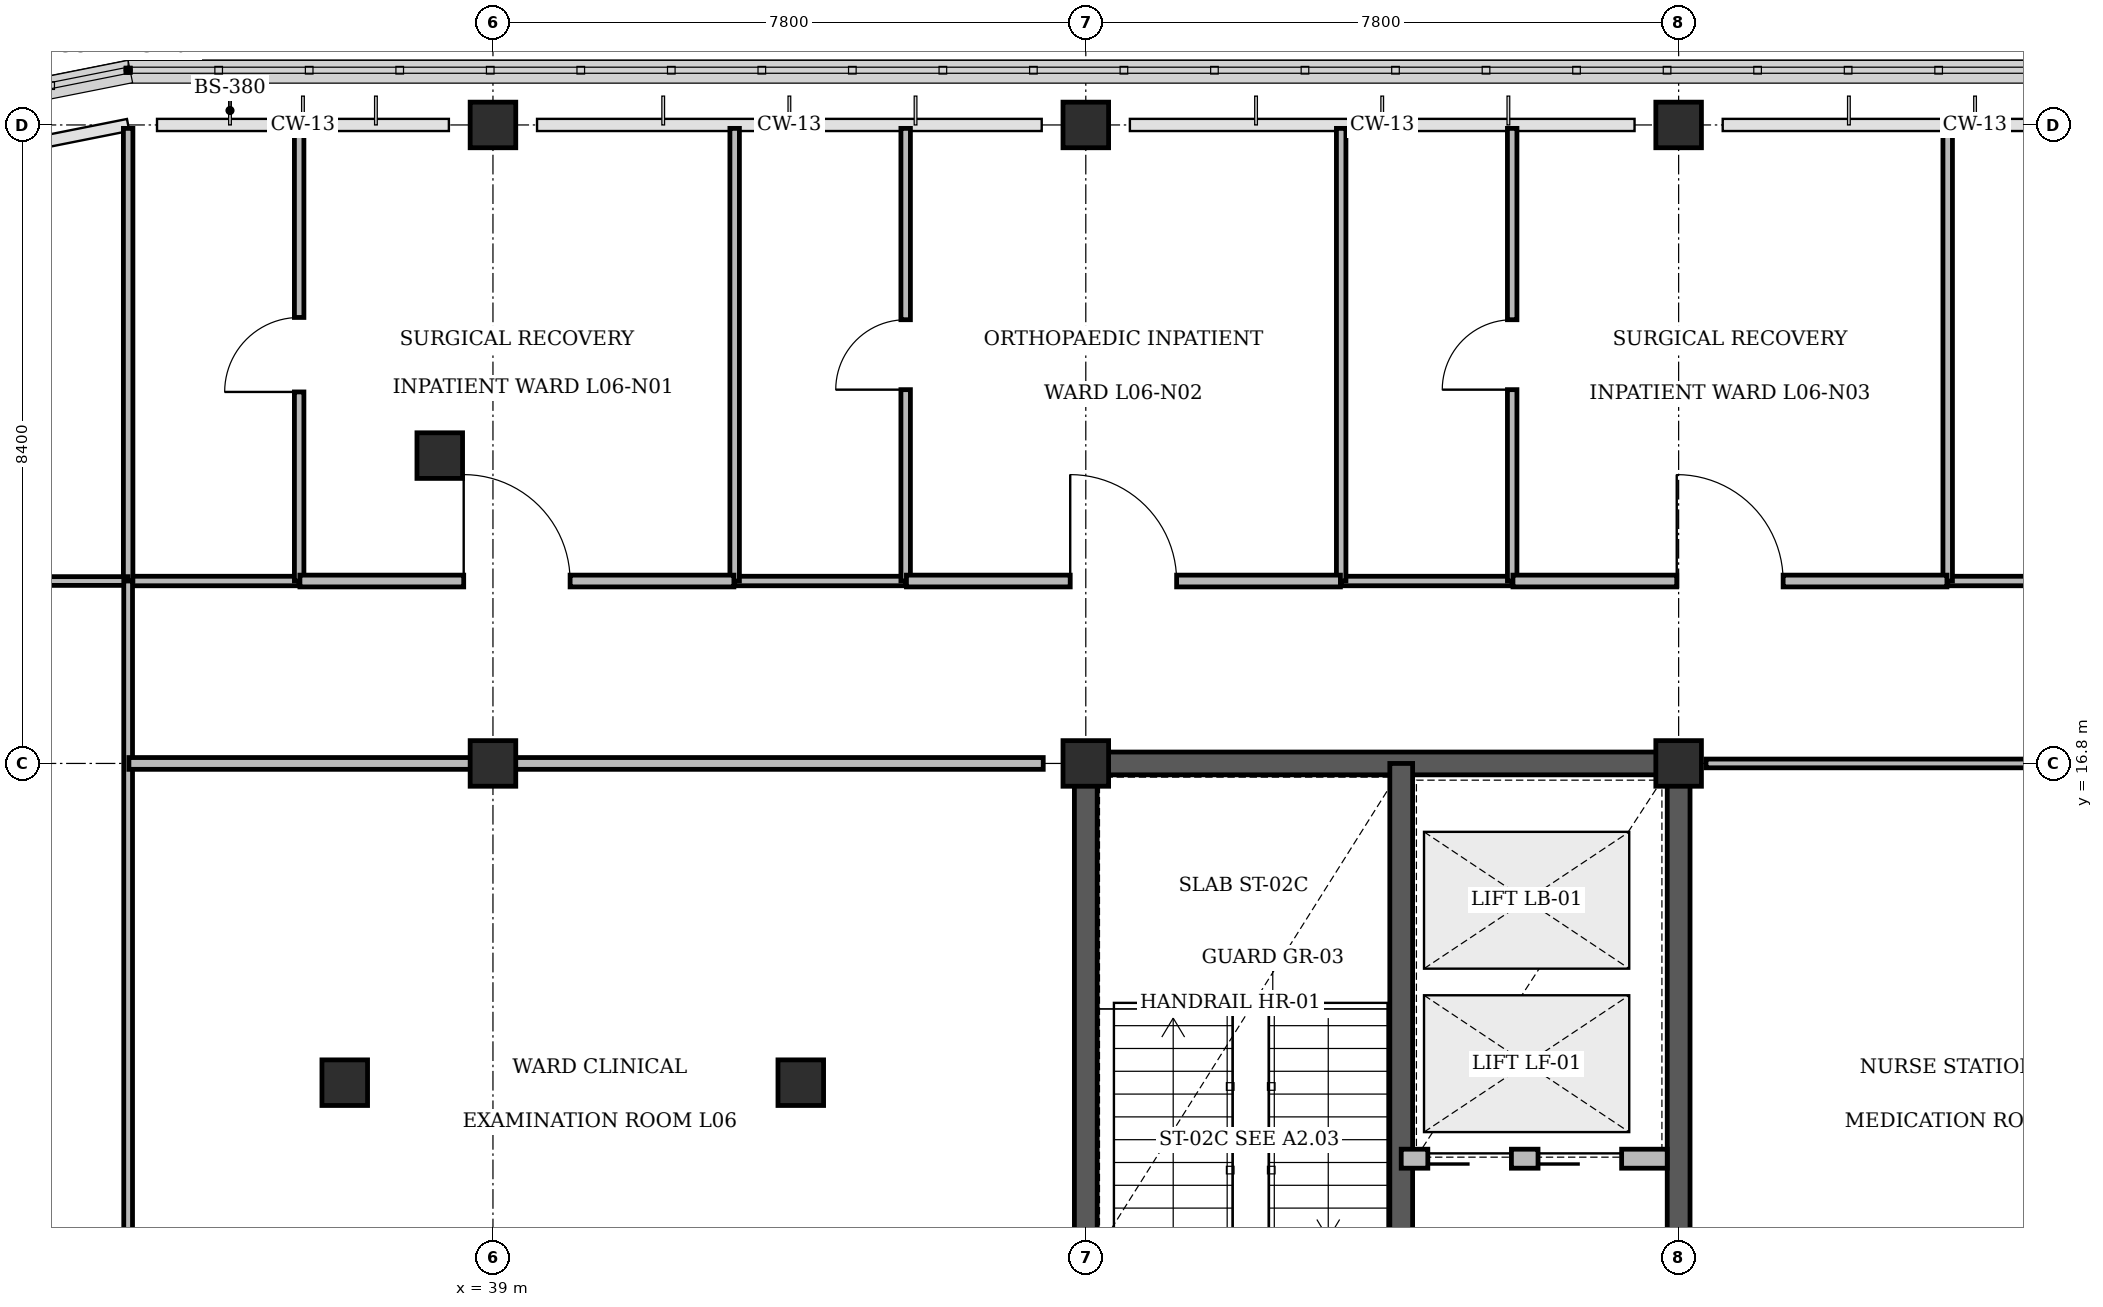
"""IFC4 building model, lengths in metres.
Left out: names, types, materials, properties, quantities, classifications, styles, units other than length and angle.
Written with IfcOpenShell. Run it as: python <this file> out.ifc"""

import sys

from ifc_helpers import new_model, si_unit, direction, frame, frame_2d, origin, origin_2d, place, context, subcontext, project, spatial, rectangle, circle, extrude, element, fill, save


model = new_model("IFC4")
c1 = context("Model", 3, precision=1e-05, world=origin(), true_north=direction((0.0, 1.0)))
c2 = subcontext(c1, "Body", "Model", "MODEL_VIEW")
j1 = project(units=[si_unit("LENGTHUNIT", "METRE"), si_unit("PLANEANGLEUNIT", "RADIAN")], contexts=[c1])
p1 = place(None, origin())
s1 = spatial("IfcSite", under=j1, at=p1, CompositionType="ELEMENT")
p2 = place(p1, origin())
s2 = spatial("IfcBuilding", under=s1, at=p2, CompositionType="ELEMENT")
p3 = place(p2, frame((0.0, 0.0, 26.4)))
s3 = spatial("IfcBuildingStorey", under=s2, at=p3, CompositionType="ELEMENT", Elevation=26.4)
p4 = place(p3, frame((46.65, 16.8, 0.0), z_axis=(0.0, 0.0, 1.0), x_axis=(1.0, 0.0, 0.0)))
e1 = element("IfcWall", 1, at=p4, inside=s3, PredefinedType="SHEAR", context=c2, shape_type="SweptSolid", body=[
    extrude(rectangle(XDim=8.1, YDim=0.3, at=frame_2d((4.05, 0.0))), origin(), (0.0, 0.0, 1.0), 3.92),
])
for number, where, z_axis, x_axis in (
    (2, (46.8, 8.4, 0.0), (0.0, 0.0, 1.0), (0.0, 1.0, 0.0)),
    (3, (54.6, 8.4, 0.0), (0.0, 0.0, 1.0), (0.0, 1.0, 0.0)),
):
    element("IfcWall", number, at=place(p3, frame(where, z_axis=z_axis, x_axis=x_axis)), inside=s3, PredefinedType="SHEAR", context=c2, shape_type="SweptSolid", body=[
        extrude(rectangle(XDim=8.4, YDim=0.3, at=frame_2d((4.2, 0.0))), origin(), (0.0, 0.0, 1.0), 3.92),
    ])
for number, where, z_axis, x_axis in (
    (4, (39.0, 16.8, 0.0), (0.0, 0.0, 1.0), (1.0, 0.0, 0.0)),
    (5, (39.0, 25.2, 0.0), (0.0, 0.0, 1.0), (1.0, 0.0, 0.0)),
    (6, (46.8, 16.8, 0.0), (0.0, 0.0, 1.0), (1.0, 0.0, 0.0)),
    (7, (46.8, 25.2, 0.0), (0.0, 0.0, 1.0), (1.0, 0.0, 0.0)),
    (8, (54.6, 16.8, 0.0), (0.0, 0.0, 1.0), (1.0, 0.0, 0.0)),
    (9, (54.6, 25.2, 0.0), (0.0, 0.0, 1.0), (1.0, 0.0, 0.0)),
):
    element("IfcColumn", number, at=place(p3, frame(where, z_axis=z_axis, x_axis=x_axis)), inside=s3, PredefinedType="COLUMN", context=c2, shape_type="SweptSolid", body=[
        extrude(rectangle(XDim=0.6, YDim=0.6, at=origin_2d()), origin(), (0.0, 0.0, 1.0), 4.2),
    ])
for number, where, z_axis, x_axis in (
    (10, (37.05, 12.6, 0.0), (0.0, 0.0, 1.0), (1.0, 0.0, 0.0)),
    (11, (38.3, 20.85, 0.0), (0.0, 0.0, 1.0), (1.0, 0.0, 0.0)),
    (12, (43.05, 12.6, 0.0), (0.0, 0.0, 1.0), (1.0, 0.0, 0.0)),
):
    element("IfcColumn", number, at=place(p3, frame(where, z_axis=z_axis, x_axis=x_axis)), inside=s3, PredefinedType="PILASTER", context=c2, shape_type="SweptSolid", body=[
        extrude(circle(Radius=0.3, at=origin_2d()), origin(), (0.0, 0.0, 1.0), 4.2),
    ])
p5 = place(p3, frame((50.95, 8.4, 0.0), z_axis=(0.0, 0.0, 1.0), x_axis=(0.0, 1.0, 0.0)))
e13 = element("IfcWall", 13, at=p5, inside=s3, PredefinedType="SHEAR", context=c2, shape_type="SweptSolid", body=[
    extrude(rectangle(XDim=8.4, YDim=0.3, at=frame_2d((4.2, 0.0))), origin(), (0.0, 0.0, 1.0), 4.2),
])
p6 = place(p5, frame((0.4, 0.0, 0.0)))
e14 = element("IfcOpeningElement", 14, at=p6, cuts=e13, PredefinedType="OPENING", context=c2, shape_type="SweptSolid", body=[
    extrude(rectangle(XDim=1.12, YDim=2.15, at=frame_2d((0.56, 1.075))), frame((0.0, 0.16, 0.0), z_axis=(0.0, -1.0, 0.0), x_axis=(1.0, 0.0, 0.0)), (0.0, 0.0, 1.0), 0.32),
])
p7 = place(p3, frame((50.95, 11.6, 0.0), z_axis=(0.0, 0.0, 1.0), x_axis=(1.0, 0.0, 0.0)))
e15 = element("IfcWall", 15, at=p7, inside=s3, PredefinedType="STANDARD", context=c2, shape_type="SweptSolid", body=[
    extrude(rectangle(XDim=3.5, YDim=0.25, at=frame_2d((1.75, 0.0))), origin(), (0.0, 0.0, 1.0), 3.9),
])
p8 = place(p7, frame((0.35, 0.0, 0.0)))
e16 = element("IfcOpeningElement", 16, at=p8, cuts=e15, PredefinedType="OPENING", context=c2, shape_type="SweptSolid", body=[
    extrude(rectangle(XDim=1.1, YDim=2.2, at=frame_2d((0.55, 1.1))), frame((0.0, 0.135, 0.0), z_axis=(0.0, -1.0, 0.0), x_axis=(1.0, 0.0, 0.0)), (0.0, 0.0, 1.0), 0.27),
])
p9 = place(p7, frame((1.8, 0.0, 0.0)))
e17 = element("IfcOpeningElement", 17, at=p9, cuts=e15, PredefinedType="OPENING", context=c2, shape_type="SweptSolid", body=[
    extrude(rectangle(XDim=1.1, YDim=2.2, at=frame_2d((0.55, 1.1))), frame((0.0, 0.135, 0.0), z_axis=(0.0, -1.0, 0.0), x_axis=(1.0, 0.0, 0.0)), (0.0, 0.0, 1.0), 0.27),
])
p10 = place(p3, frame((34.2, 19.2, 0.0), z_axis=(0.0, 0.0, 1.0), x_axis=(1.0, 0.0, 0.0)))
e18 = element("IfcWall", 18, at=p10, inside=s3, PredefinedType="PARTITIONING", context=c2, shape_type="SweptSolid", body=[
    extrude(rectangle(XDim=2.25, YDim=0.125, at=frame_2d((1.125, 0.0))), origin(), (0.0, 0.0, 1.0), 3.9),
])
p11 = place(p3, frame((34.2, 19.2, 0.0), z_axis=(0.0, 0.0, 1.0), x_axis=(0.0, 1.0, 0.0)))
e19 = element("IfcWall", 19, at=p11, inside=s3, PredefinedType="PARTITIONING", context=c2, shape_type="SweptSolid", body=[
    extrude(rectangle(XDim=5.955, YDim=0.125, at=frame_2d((2.978, 0.0))), origin(), (0.0, 0.0, 1.0), 3.9),
])
p12 = place(p3, frame((36.45, 19.2, 0.0), z_axis=(0.0, 0.0, 1.0), x_axis=(0.0, 1.0, 0.0)))
e20 = element("IfcWall", 20, at=p12, inside=s3, PredefinedType="PARTITIONING", context=c2, shape_type="SweptSolid", body=[
    extrude(rectangle(XDim=5.955, YDim=0.125, at=frame_2d((2.978, 0.0))), origin(), (0.0, 0.0, 1.0), 3.9),
])
p13 = place(p12, frame((2.488, 0.0, 0.0)))
e21 = element("IfcOpeningElement", 21, at=p13, cuts=e20, PredefinedType="OPENING", context=c2, shape_type="SweptSolid", body=[
    extrude(rectangle(XDim=0.98, YDim=2.1, at=frame_2d((0.49, 1.05))), frame((0.0, 0.073, 0.0), z_axis=(0.0, -1.0, 0.0), x_axis=(1.0, 0.0, 0.0)), (0.0, 0.0, 1.0), 0.145),
])
p14 = place(p3, frame((42.18, 19.2, 0.0), z_axis=(0.0, 0.0, 1.0), x_axis=(1.0, 0.0, 0.0)))
e22 = element("IfcWall", 22, at=p14, inside=s3, PredefinedType="PARTITIONING", context=c2, shape_type="SweptSolid", body=[
    extrude(rectangle(XDim=2.25, YDim=0.125, at=frame_2d((1.125, 0.0))), origin(), (0.0, 0.0, 1.0), 3.9),
])
p15 = place(p3, frame((42.18, 19.2, 0.0), z_axis=(0.0, 0.0, 1.0), x_axis=(0.0, 1.0, 0.0)))
e23 = element("IfcWall", 23, at=p15, inside=s3, PredefinedType="PARTITIONING", context=c2, shape_type="SweptSolid", body=[
    extrude(rectangle(XDim=5.955, YDim=0.125, at=frame_2d((2.978, 0.0))), origin(), (0.0, 0.0, 1.0), 3.9),
])
p16 = place(p3, frame((44.43, 19.2, 0.0), z_axis=(0.0, 0.0, 1.0), x_axis=(0.0, 1.0, 0.0)))
e24 = element("IfcWall", 24, at=p16, inside=s3, PredefinedType="PARTITIONING", context=c2, shape_type="SweptSolid", body=[
    extrude(rectangle(XDim=5.955, YDim=0.125, at=frame_2d((2.978, 0.0))), origin(), (0.0, 0.0, 1.0), 3.9),
])
p17 = place(p16, frame((2.518, 0.0, 0.0)))
e25 = element("IfcOpeningElement", 25, at=p17, cuts=e24, PredefinedType="OPENING", context=c2, shape_type="SweptSolid", body=[
    extrude(rectangle(XDim=0.92, YDim=2.1, at=frame_2d((0.46, 1.05))), frame((0.0, 0.073, 0.0), z_axis=(0.0, -1.0, 0.0), x_axis=(1.0, 0.0, 0.0)), (0.0, 0.0, 1.0), 0.145),
])
p18 = place(p3, frame((50.16, 19.2, 0.0), z_axis=(0.0, 0.0, 1.0), x_axis=(1.0, 0.0, 0.0)))
e26 = element("IfcWall", 26, at=p18, inside=s3, PredefinedType="PARTITIONING", context=c2, shape_type="SweptSolid", body=[
    extrude(rectangle(XDim=2.25, YDim=0.125, at=frame_2d((1.125, 0.0))), origin(), (0.0, 0.0, 1.0), 3.9),
])
p19 = place(p3, frame((50.16, 19.2, 0.0), z_axis=(0.0, 0.0, 1.0), x_axis=(0.0, 1.0, 0.0)))
e27 = element("IfcWall", 27, at=p19, inside=s3, PredefinedType="PARTITIONING", context=c2, shape_type="SweptSolid", body=[
    extrude(rectangle(XDim=5.955, YDim=0.125, at=frame_2d((2.978, 0.0))), origin(), (0.0, 0.0, 1.0), 3.9),
])
p20 = place(p3, frame((52.41, 19.2, 0.0), z_axis=(0.0, 0.0, 1.0), x_axis=(0.0, 1.0, 0.0)))
e28 = element("IfcWall", 28, at=p20, inside=s3, PredefinedType="PARTITIONING", context=c2, shape_type="SweptSolid", body=[
    extrude(rectangle(XDim=5.955, YDim=0.125, at=frame_2d((2.978, 0.0))), origin(), (0.0, 0.0, 1.0), 3.9),
])
p21 = place(p20, frame((2.518, 0.0, 0.0)))
e29 = element("IfcOpeningElement", 29, at=p21, cuts=e28, PredefinedType="OPENING", context=c2, shape_type="SweptSolid", body=[
    extrude(rectangle(XDim=0.92, YDim=2.1, at=frame_2d((0.46, 1.05))), frame((0.0, 0.073, 0.0), z_axis=(0.0, -1.0, 0.0), x_axis=(1.0, 0.0, 0.0)), (0.0, 0.0, 1.0), 0.145),
])
p22 = place(p3, frame((58.14, 19.2, 0.0), z_axis=(0.0, 0.0, 1.0), x_axis=(1.0, 0.0, 0.0)))
e30 = element("IfcWall", 30, at=p22, inside=s3, PredefinedType="PARTITIONING", context=c2, shape_type="SweptSolid", body=[
    extrude(rectangle(XDim=2.25, YDim=0.125, at=frame_2d((1.125, 0.0))), origin(), (0.0, 0.0, 1.0), 3.9),
])
p23 = place(p3, frame((58.14, 19.2, 0.0), z_axis=(0.0, 0.0, 1.0), x_axis=(0.0, 1.0, 0.0)))
e31 = element("IfcWall", 31, at=p23, inside=s3, PredefinedType="PARTITIONING", context=c2, shape_type="SweptSolid", body=[
    extrude(rectangle(XDim=5.955, YDim=0.125, at=frame_2d((2.978, 0.0))), origin(), (0.0, 0.0, 1.0), 3.9),
])
p24 = place(p3, frame((22.1, 19.2, 0.0), z_axis=(0.0, 0.0, 1.0), x_axis=(1.0, 0.0, 0.0)))
e32 = element("IfcWall", 32, at=p24, inside=s3, PredefinedType="PARTITIONING", context=c2, shape_type="SweptSolid", body=[
    extrude(rectangle(XDim=12.1, YDim=0.115, at=frame_2d((6.05, 0.0))), origin(), (0.0, 0.0, 1.0), 3.9),
])
p25 = place(p3, frame((34.2, 6.0, 0.0), z_axis=(0.0, 0.0, 1.0), x_axis=(0.0, 1.0, 0.0)))
e33 = element("IfcWall", 33, at=p25, inside=s3, PredefinedType="PARTITIONING", context=c2, shape_type="SweptSolid", body=[
    extrude(rectangle(XDim=13.2, YDim=0.115, at=frame_2d((6.6, 0.0))), origin(), (0.0, 0.0, 1.0), 3.9),
])
p26 = place(p25, frame((0.85, 0.0, 0.0)))
e34 = element("IfcOpeningElement", 34, at=p26, cuts=e33, PredefinedType="OPENING", context=c2, shape_type="SweptSolid", body=[
    extrude(rectangle(XDim=1.32, YDim=2.15, at=frame_2d((0.66, 1.075))), frame((0.0, 0.067, 0.0), z_axis=(0.0, -1.0, 0.0), x_axis=(1.0, 0.0, 0.0)), (0.0, 0.0, 1.0), 0.135),
])
p27 = place(p3, frame((36.46, 19.2, 0.0), z_axis=(0.0, 0.0, 1.0), x_axis=(1.0, 0.0, 0.0)))
e35 = element("IfcWall", 35, at=p27, inside=s3, PredefinedType="PARTITIONING", context=c2, shape_type="SweptSolid", body=[
    extrude(rectangle(XDim=5.71, YDim=0.155, at=frame_2d((2.855, 0.0))), origin(), (0.0, 0.0, 1.0), 3.9),
])
p28 = place(p27, frame((2.155, 0.0, 0.0)))
e36 = element("IfcOpeningElement", 36, at=p28, cuts=e35, PredefinedType="OPENING", context=c2, shape_type="SweptSolid", body=[
    extrude(rectangle(XDim=1.4, YDim=2.2, at=frame_2d((0.7, 1.1))), frame((0.0, 0.087, 0.0), z_axis=(0.0, -1.0, 0.0), x_axis=(1.0, 0.0, 0.0)), (0.0, 0.0, 1.0), 0.175),
])
p29 = place(p3, frame((44.44, 19.2, 0.0), z_axis=(0.0, 0.0, 1.0), x_axis=(1.0, 0.0, 0.0)))
e37 = element("IfcWall", 37, at=p29, inside=s3, PredefinedType="PARTITIONING", context=c2, shape_type="SweptSolid", body=[
    extrude(rectangle(XDim=5.71, YDim=0.155, at=frame_2d((2.855, 0.0))), origin(), (0.0, 0.0, 1.0), 3.9),
])
p30 = place(p29, frame((2.155, 0.0, 0.0)))
e38 = element("IfcOpeningElement", 38, at=p30, cuts=e37, PredefinedType="OPENING", context=c2, shape_type="SweptSolid", body=[
    extrude(rectangle(XDim=1.4, YDim=2.2, at=frame_2d((0.7, 1.1))), frame((0.0, 0.087, 0.0), z_axis=(0.0, -1.0, 0.0), x_axis=(1.0, 0.0, 0.0)), (0.0, 0.0, 1.0), 0.175),
])
p31 = place(p3, frame((52.42, 19.2, 0.0), z_axis=(0.0, 0.0, 1.0), x_axis=(1.0, 0.0, 0.0)))
e39 = element("IfcWall", 39, at=p31, inside=s3, PredefinedType="PARTITIONING", context=c2, shape_type="SweptSolid", body=[
    extrude(rectangle(XDim=5.71, YDim=0.155, at=frame_2d((2.855, 0.0))), origin(), (0.0, 0.0, 1.0), 3.9),
])
p32 = place(p31, frame((2.155, 0.0, 0.0)))
e40 = element("IfcOpeningElement", 40, at=p32, cuts=e39, PredefinedType="OPENING", context=c2, shape_type="SweptSolid", body=[
    extrude(rectangle(XDim=1.4, YDim=2.2, at=frame_2d((0.7, 1.1))), frame((0.0, 0.087, 0.0), z_axis=(0.0, -1.0, 0.0), x_axis=(1.0, 0.0, 0.0)), (0.0, 0.0, 1.0), 0.175),
])
p33 = place(p3, frame((54.96, 16.8, 0.0), z_axis=(0.0, 0.0, 1.0), x_axis=(1.0, 0.0, 0.0)))
e41 = element("IfcWall", 41, at=p33, inside=s3, PredefinedType="PARTITIONING", context=c2, shape_type="SweptSolid", body=[
    extrude(rectangle(XDim=7.08, YDim=0.115, at=frame_2d((3.54, 0.0))), origin(), (0.0, 0.0, 1.0), 3.27),
])
p34 = place(p3, frame((34.21, 16.8, 0.0), z_axis=(0.0, 0.0, 1.0), x_axis=(1.0, 0.0, 0.0)))
e42 = element("IfcWall", 42, at=p34, inside=s3, PredefinedType="PARTITIONING", context=c2, shape_type="SweptSolid", body=[
    extrude(rectangle(XDim=12.03, YDim=0.155, at=frame_2d((6.015, 0.0))), origin(), (0.0, 0.0, 1.0), 3.27),
])
p35 = place(p8, origin())
e43 = element("IfcDoor", 43, at=p35, inside=s3, OperationType="SLIDING_TO_LEFT", PredefinedType="DOOR", context=c2, shape_type="SweptSolid", body=[
    extrude(rectangle(XDim=1.1, YDim=2.2, at=frame_2d((0.55, 1.1))), frame((0.0, 0.025, 0.0), z_axis=(0.0, -1.0, 0.0), x_axis=(1.0, 0.0, 0.0)), (0.0, 0.0, 1.0), 0.05),
])
fill(e16, e43)
p36 = place(p9, origin())
e44 = element("IfcDoor", 44, at=p36, inside=s3, OperationType="SLIDING_TO_LEFT", PredefinedType="DOOR", context=c2, shape_type="SweptSolid", body=[
    extrude(rectangle(XDim=1.1, YDim=2.2, at=frame_2d((0.55, 1.1))), frame((0.0, 0.025, 0.0), z_axis=(0.0, -1.0, 0.0), x_axis=(1.0, 0.0, 0.0)), (0.0, 0.0, 1.0), 0.05),
])
fill(e17, e44)
p37 = place(p13, origin())
e45 = element("IfcDoor", 45, at=p37, inside=s3, OperationType="SINGLE_SWING_LEFT", PredefinedType="DOOR", context=c2, shape_type="SweptSolid", body=[
    extrude(rectangle(XDim=0.98, YDim=2.1, at=frame_2d((0.49, 1.05))), frame((0.0, 0.025, 0.0), z_axis=(0.0, -1.0, 0.0), x_axis=(1.0, 0.0, 0.0)), (0.0, 0.0, 1.0), 0.05),
])
fill(e21, e45)
p38 = place(p17, origin())
e46 = element("IfcDoor", 46, at=p38, inside=s3, OperationType="SINGLE_SWING_LEFT", PredefinedType="DOOR", context=c2, shape_type="SweptSolid", body=[
    extrude(rectangle(XDim=0.92, YDim=2.1, at=frame_2d((0.46, 1.05))), frame((0.0, 0.025, 0.0), z_axis=(0.0, -1.0, 0.0), x_axis=(1.0, 0.0, 0.0)), (0.0, 0.0, 1.0), 0.05),
])
fill(e25, e46)
p39 = place(p21, origin())
e47 = element("IfcDoor", 47, at=p39, inside=s3, OperationType="SINGLE_SWING_LEFT", PredefinedType="DOOR", context=c2, shape_type="SweptSolid", body=[
    extrude(rectangle(XDim=0.92, YDim=2.1, at=frame_2d((0.46, 1.05))), frame((0.0, 0.025, 0.0), z_axis=(0.0, -1.0, 0.0), x_axis=(1.0, 0.0, 0.0)), (0.0, 0.0, 1.0), 0.05),
])
fill(e29, e47)
p40 = place(p28, origin())
e48 = element("IfcDoor", 48, at=p40, inside=s3, OperationType="SINGLE_SWING_LEFT", PredefinedType="DOOR", context=c2, shape_type="SweptSolid", body=[
    extrude(rectangle(XDim=1.4, YDim=2.2, at=frame_2d((0.7, 1.1))), frame((0.0, 0.025, 0.0), z_axis=(0.0, -1.0, 0.0), x_axis=(1.0, 0.0, 0.0)), (0.0, 0.0, 1.0), 0.05),
])
fill(e36, e48)
p41 = place(p30, origin())
e49 = element("IfcDoor", 49, at=p41, inside=s3, OperationType="SINGLE_SWING_LEFT", PredefinedType="DOOR", context=c2, shape_type="SweptSolid", body=[
    extrude(rectangle(XDim=1.4, YDim=2.2, at=frame_2d((0.7, 1.1))), frame((0.0, 0.025, 0.0), z_axis=(0.0, -1.0, 0.0), x_axis=(1.0, 0.0, 0.0)), (0.0, 0.0, 1.0), 0.05),
])
fill(e38, e49)
p42 = place(p32, origin())
e50 = element("IfcDoor", 50, at=p42, inside=s3, OperationType="SINGLE_SWING_LEFT", PredefinedType="DOOR", context=c2, shape_type="SweptSolid", body=[
    extrude(rectangle(XDim=1.4, YDim=2.2, at=frame_2d((0.7, 1.1))), frame((0.0, 0.025, 0.0), z_axis=(0.0, -1.0, 0.0), x_axis=(1.0, 0.0, 0.0)), (0.0, 0.0, 1.0), 0.05),
])
fill(e40, e50)
save(model, sys.argv[1])
